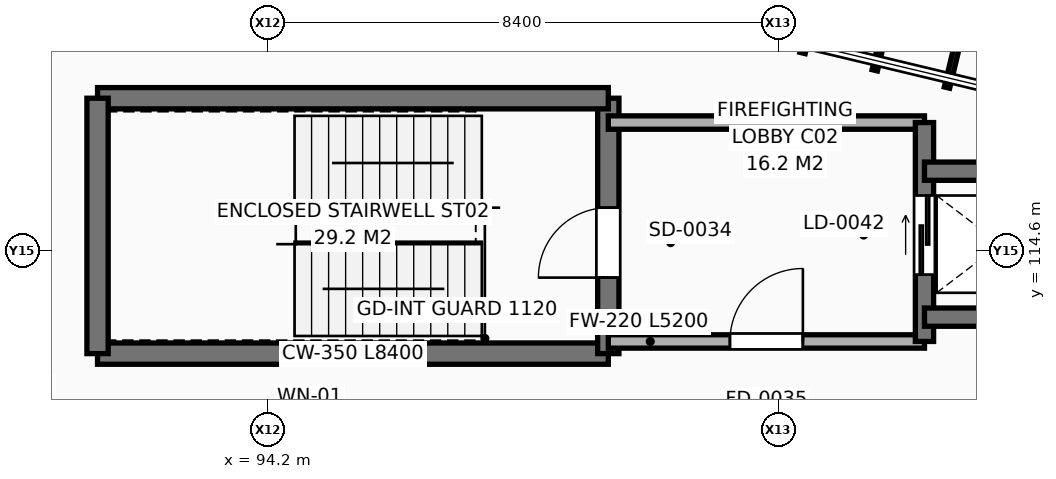
"""IFC4 building model, lengths in metres.
Left out: names, types, materials, properties, quantities, classifications, styles, units other than length and angle.
Written with IfcOpenShell. Run it as: python <this file> out.ifc"""

import sys

from ifc_helpers import new_model, si_unit, direction, frame, frame_2d, origin, place, context, subcontext, project, spatial, rectangle, extrude, element, fill, save


model = new_model("IFC4")
c1 = context("Model", 3, precision=1e-05, world=origin(), true_north=direction((0.0, 1.0)))
c2 = subcontext(c1, "Body", "Model", "MODEL_VIEW")
j1 = project(units=[si_unit("LENGTHUNIT", "METRE"), si_unit("PLANEANGLEUNIT", "RADIAN")], contexts=[c1])
p1 = place(None, origin())
s1 = spatial("IfcSite", under=j1, at=p1, CompositionType="ELEMENT")
p2 = place(p1, origin())
s2 = spatial("IfcBuilding", under=s1, at=p2, CompositionType="ELEMENT")
p3 = place(p2, frame((0.0, 0.0, 26.4)))
s3 = spatial("IfcBuildingStorey", under=s2, at=p3, CompositionType="ELEMENT", Elevation=26.4)
p4 = place(p3, frame((99.029, 111.496, 0.0), z_axis=(0.0, 0.0, 1.0), x_axis=(-0.999198007922, 0.040041740285, 0.0)))
e1 = element("IfcWall", 1, at=p4, inside=s3, PredefinedType="SOLIDWALL", context=c2, shape_type="SweptSolid", body=[
    extrude(rectangle(XDim=13.097, YDim=0.34, at=frame_2d((6.548, 0.0))), origin(), (0.0, 0.0, 1.0), 3.463),
])
p5 = place(p4, frame((3.566, 0.0, 0.9)))
e2 = element("IfcOpeningElement", 2, at=p5, cuts=e1, PredefinedType="OPENING", context=c2, shape_type="SweptSolid", body=[
    extrude(rectangle(XDim=1.2, YDim=2.1, at=frame_2d((0.6, 1.05))), frame((0.0, 0.18, 0.0), z_axis=(0.0, -1.0, 0.0), x_axis=(1.0, 0.0, 0.0)), (0.0, 0.0, 1.0), 0.36),
])
p6 = place(p4, frame((8.331, 0.0, 0.9)))
e3 = element("IfcOpeningElement", 3, at=p6, cuts=e1, PredefinedType="OPENING", context=c2, shape_type="SweptSolid", body=[
    extrude(rectangle(XDim=1.2, YDim=2.1, at=frame_2d((0.6, 1.05))), frame((0.0, 0.18, 0.0), z_axis=(0.0, -1.0, 0.0), x_axis=(1.0, 0.0, 0.0)), (0.0, 0.0, 1.0), 0.36),
])
p7 = place(p3, frame((91.4, 112.9, 0.0), z_axis=(0.0, 0.0, 1.0), x_axis=(1.0, 0.0, 0.0)))
e4 = element("IfcWall", 4, at=p7, inside=s3, PredefinedType="SHEAR", context=c2, shape_type="SweptSolid", body=[
    extrude(rectangle(XDim=8.4, YDim=0.35, at=frame_2d((4.2, 0.0))), origin(), (0.0, 0.0, 1.0), 3.92),
])
p8 = place(p3, frame((99.8, 112.9, 0.0), z_axis=(0.0, 0.0, 1.0), x_axis=(0.0, 1.0, 0.0)))
e5 = element("IfcWall", 5, at=p8, inside=s3, PredefinedType="SHEAR", context=c2, shape_type="SweptSolid", body=[
    extrude(rectangle(XDim=4.2, YDim=0.35, at=frame_2d((2.1, 0.0))), origin(), (0.0, 0.0, 1.0), 3.92),
])
p9 = place(p8, frame((1.25, 0.0, 0.0)))
e6 = element("IfcOpeningElement", 6, at=p9, cuts=e5, PredefinedType="OPENING", context=c2, shape_type="SweptSolid", body=[
    extrude(rectangle(XDim=1.15, YDim=2.2, at=frame_2d((0.575, 1.1))), frame((0.0, 0.185, 0.0), z_axis=(0.0, -1.0, 0.0), x_axis=(1.0, 0.0, 0.0)), (0.0, 0.0, 1.0), 0.37),
])
p10 = place(p3, frame((99.8, 117.1, 0.0), z_axis=(0.0, 0.0, 1.0), x_axis=(-1.0, 0.0, 0.0)))
e7 = element("IfcWall", 7, at=p10, inside=s3, PredefinedType="SHEAR", context=c2, shape_type="SweptSolid", body=[
    extrude(rectangle(XDim=8.4, YDim=0.35, at=frame_2d((4.2, 0.0))), origin(), (0.0, 0.0, 1.0), 3.92),
])
p11 = place(p3, frame((91.4, 117.1, 0.0), z_axis=(0.0, 0.0, 1.0), x_axis=(0.0, -1.0, 0.0)))
e8 = element("IfcWall", 8, at=p11, inside=s3, PredefinedType="SHEAR", context=c2, shape_type="SweptSolid", body=[
    extrude(rectangle(XDim=4.2, YDim=0.35, at=frame_2d((2.1, 0.0))), origin(), (0.0, 0.0, 1.0), 3.92),
])
p12 = place(p3, frame((99.8, 113.1, 0.0), z_axis=(0.0, 0.0, 1.0), x_axis=(1.0, 0.0, 0.0)))
e9 = element("IfcWall", 9, at=p12, inside=s3, PredefinedType="SOLIDWALL", context=c2, shape_type="SweptSolid", body=[
    extrude(rectangle(XDim=5.2, YDim=0.22, at=frame_2d((2.6, 0.0))), origin(), (0.0, 0.0, 1.0), 3.92),
])
p13 = place(p12, frame((2.0, 0.0, 0.0)))
e10 = element("IfcOpeningElement", 10, at=p13, cuts=e9, PredefinedType="OPENING", context=c2, shape_type="SweptSolid", body=[
    extrude(rectangle(XDim=1.2, YDim=2.2, at=frame_2d((0.6, 1.1))), frame((0.0, 0.12, 0.0), z_axis=(0.0, -1.0, 0.0), x_axis=(1.0, 0.0, 0.0)), (0.0, 0.0, 1.0), 0.24),
])
p14 = place(p3, frame((105.0, 116.7, 0.0), z_axis=(0.0, 0.0, 1.0), x_axis=(-1.0, 0.0, 0.0)))
e11 = element("IfcWall", 11, at=p14, inside=s3, PredefinedType="SOLIDWALL", context=c2, shape_type="SweptSolid", body=[
    extrude(rectangle(XDim=5.2, YDim=0.22, at=frame_2d((2.6, 0.0))), origin(), (0.0, 0.0, 1.0), 3.92),
])
p15 = place(p3, frame((105.0, 113.1, 0.0), z_axis=(0.0, 0.0, 1.0), x_axis=(0.0, 1.0, 0.0)))
e12 = element("IfcWall", 12, at=p15, inside=s3, PredefinedType="SHEAR", context=c2, shape_type="SweptSolid", body=[
    extrude(rectangle(XDim=3.6, YDim=0.3, at=frame_2d((1.8, 0.0))), origin(), (0.0, 0.0, 1.0), 3.92),
])
p16 = place(p15, frame((1.1, 0.0, 0.0)))
e13 = element("IfcOpeningElement", 13, at=p16, cuts=e12, PredefinedType="OPENING", context=c2, shape_type="SweptSolid", body=[
    extrude(rectangle(XDim=1.3, YDim=2.3, at=frame_2d((0.65, 1.15))), frame((0.0, 0.16, 0.0), z_axis=(0.0, -1.0, 0.0), x_axis=(1.0, 0.0, 0.0)), (0.0, 0.0, 1.0), 0.32),
])
for number, where, z_axis, x_axis in (
    (14, (107.5, 115.9, 0.0), (0.0, 0.0, 1.0), (-1.0, 0.0, 0.0)),
    (15, (105.0, 113.5, 0.0), (0.0, 0.0, 1.0), (1.0, 0.0, 0.0)),
):
    element("IfcWall", number, at=place(p3, frame(where, z_axis=z_axis, x_axis=x_axis)), inside=s3, PredefinedType="SHEAR", context=c2, shape_type="SweptSolid", body=[
        extrude(rectangle(XDim=2.5, YDim=0.3, at=frame_2d((1.25, 0.0))), origin(), (0.0, 0.0, 1.0), 3.92),
    ])
p17 = place(p9, origin())
e16 = element("IfcDoor", 16, at=p17, inside=s3, OperationType="SINGLE_SWING_LEFT", PredefinedType="DOOR", context=c2, shape_type="SweptSolid", body=[
    extrude(rectangle(XDim=1.15, YDim=2.2, at=frame_2d((0.575, 1.1))), frame((0.0, 0.025, 0.0), z_axis=(0.0, -1.0, 0.0), x_axis=(1.0, 0.0, 0.0)), (0.0, 0.0, 1.0), 0.05),
])
fill(e6, e16)
p18 = place(p13, origin())
e17 = element("IfcDoor", 17, at=p18, inside=s3, OperationType="SINGLE_SWING_RIGHT", PredefinedType="DOOR", context=c2, shape_type="SweptSolid", body=[
    extrude(rectangle(XDim=1.2, YDim=2.2, at=frame_2d((0.6, 1.1))), frame((0.0, 0.025, 0.0), z_axis=(0.0, -1.0, 0.0), x_axis=(1.0, 0.0, 0.0)), (0.0, 0.0, 1.0), 0.05),
])
fill(e10, e17)
p19 = place(p16, origin())
e18 = element("IfcDoor", 18, at=p19, inside=s3, OperationType="SLIDING_TO_LEFT", PredefinedType="DOOR", context=c2, shape_type="SweptSolid", body=[
    extrude(rectangle(XDim=1.3, YDim=2.3, at=frame_2d((0.65, 1.15))), frame((0.0, 0.025, 0.0), z_axis=(0.0, -1.0, 0.0), x_axis=(1.0, 0.0, 0.0)), (0.0, 0.0, 1.0), 0.05),
])
fill(e13, e18)
save(model, sys.argv[1])
